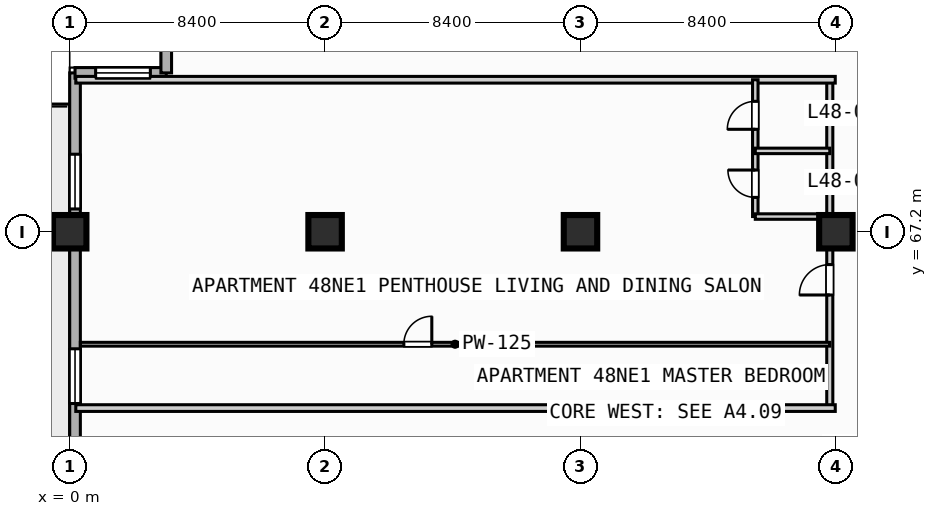
"""IFC4 building model, lengths in metres.
Left out: names, types, materials, properties, quantities, classifications, styles, units other than length and angle.
Written with IfcOpenShell. Run it as: python <this file> out.ifc"""

import sys

from ifc_helpers import new_model, si_unit, direction, frame, frame_2d, origin, origin_2d, place, context, subcontext, project, spatial, rectangle, extrude, element, fill, save


model = new_model("IFC4")
c1 = context("Model", 3, precision=1e-05, world=origin(), true_north=direction((0.0, 1.0)))
c2 = subcontext(c1, "Body", "Model", "MODEL_VIEW")
j1 = project(units=[si_unit("LENGTHUNIT", "METRE"), si_unit("PLANEANGLEUNIT", "RADIAN")], contexts=[c1])
p1 = place(None, origin())
s1 = spatial("IfcSite", under=j1, at=p1, CompositionType="ELEMENT")
p2 = place(p1, origin())
s2 = spatial("IfcBuilding", under=s1, at=p2, CompositionType="ELEMENT")
p3 = place(p2, frame((0.0, 0.0, 197.6)))
s3 = spatial("IfcBuildingStorey", under=s2, at=p3, CompositionType="ELEMENT", Elevation=197.6)
for number, where, z_axis, x_axis in (
    (1, (0.0, 67.2, 0.0), (0.0, 0.0, 1.0), (1.0, 0.0, 0.0)),
    (2, (8.4, 67.2, 0.0), (0.0, 0.0, 1.0), (1.0, 0.0, 0.0)),
    (3, (16.8, 67.2, 0.0), (0.0, 0.0, 1.0), (1.0, 0.0, 0.0)),
    (4, (25.2, 67.2, 0.0), (0.0, 0.0, 1.0), (1.0, 0.0, 0.0)),
):
    element("IfcColumn", number, at=place(p3, frame(where, z_axis=z_axis, x_axis=x_axis)), inside=s3, PredefinedType="COLUMN", context=c2, shape_type="SweptSolid", body=[
        extrude(rectangle(XDim=1.1, YDim=1.1, at=origin_2d()), origin(), (0.0, 0.0, 1.0), 3.7),
    ])
p4 = place(p3, frame((0.175, 3.175, 0.0), z_axis=(0.0, 0.0, 1.0), x_axis=(0.0, 1.0, 0.0)))
e5 = element("IfcWall", 5, at=p4, inside=s3, PredefinedType="STANDARD", context=c2, shape_type="SweptSolid", body=[
    extrude(rectangle(XDim=69.25, YDim=0.35, at=frame_2d((34.625, 0.0))), origin(), (0.0, 0.0, 1.0), 3.47),
])
p5 = place(p4, frame((42.325, 0.0, 0.0)))
e6 = element("IfcOpeningElement", 6, at=p5, cuts=e5, PredefinedType="OPENING", context=c2, shape_type="SweptSolid", body=[
    extrude(rectangle(XDim=1.4, YDim=2.2, at=frame_2d((0.7, 1.1))), frame((0.0, 0.185, 0.0), z_axis=(0.0, -1.0, 0.0), x_axis=(1.0, 0.0, 0.0)), (0.0, 0.0, 1.0), 0.37),
])
p6 = place(p4, frame((25.025, 0.0, 0.85)))
e7 = element("IfcOpeningElement", 7, at=p6, cuts=e5, PredefinedType="OPENING", context=c2, shape_type="SweptSolid", body=[
    extrude(rectangle(XDim=2.4, YDim=1.95, at=frame_2d((1.2, 0.975))), frame((0.0, 0.185, 0.0), z_axis=(0.0, -1.0, 0.0), x_axis=(1.0, 0.0, 0.0)), (0.0, 0.0, 1.0), 0.37),
])
p7 = place(p4, frame((33.725, 0.0, 0.85)))
e8 = element("IfcOpeningElement", 8, at=p7, cuts=e5, PredefinedType="OPENING", context=c2, shape_type="SweptSolid", body=[
    extrude(rectangle(XDim=1.8, YDim=1.8, at=frame_2d((0.9, 0.9))), frame((0.0, 0.185, 0.0), z_axis=(0.0, -1.0, 0.0), x_axis=(1.0, 0.0, 0.0)), (0.0, 0.0, 1.0), 0.37),
])
p8 = place(p4, frame((58.375, 0.0, 0.85)))
e9 = element("IfcOpeningElement", 9, at=p8, cuts=e5, PredefinedType="OPENING", context=c2, shape_type="SweptSolid", body=[
    extrude(rectangle(XDim=1.8, YDim=1.8, at=frame_2d((0.9, 0.9))), frame((0.0, 0.185, 0.0), z_axis=(0.0, -1.0, 0.0), x_axis=(1.0, 0.0, 0.0)), (0.0, 0.0, 1.0), 0.37),
])
p9 = place(p4, frame((64.775, 0.0, 0.85)))
e10 = element("IfcOpeningElement", 10, at=p9, cuts=e5, PredefinedType="OPENING", context=c2, shape_type="SweptSolid", body=[
    extrude(rectangle(XDim=1.8, YDim=1.8, at=frame_2d((0.9, 0.9))), frame((0.0, 0.185, 0.0), z_axis=(0.0, -1.0, 0.0), x_axis=(1.0, 0.0, 0.0)), (0.0, 0.0, 1.0), 0.37),
])
p10 = place(p3, frame((0.175, 72.425, 0.0), z_axis=(0.0, 0.0, 1.0), x_axis=(1.0, 0.0, 0.0)))
e11 = element("IfcWall", 11, at=p10, inside=s3, PredefinedType="STANDARD", context=c2, shape_type="SweptSolid", body=[
    extrude(rectangle(XDim=3.0, YDim=0.35, at=frame_2d((1.5, 0.0))), origin(), (0.0, 0.0, 1.0), 3.47),
])
p11 = place(p10, frame((0.677, 0.0, 0.85)))
e12 = element("IfcOpeningElement", 12, at=p11, cuts=e11, PredefinedType="OPENING", context=c2, shape_type="SweptSolid", body=[
    extrude(rectangle(XDim=1.8, YDim=1.8, at=frame_2d((0.9, 0.9))), frame((0.0, 0.185, 0.0), z_axis=(0.0, -1.0, 0.0), x_axis=(1.0, 0.0, 0.0)), (0.0, 0.0, 1.0), 0.37),
])
p12 = place(p3, frame((3.175, 72.425, 0.0), z_axis=(0.0, 0.0, 1.0), x_axis=(0.0, 1.0, 0.0)))
e13 = element("IfcWall", 13, at=p12, inside=s3, PredefinedType="STANDARD", context=c2, shape_type="SweptSolid", body=[
    extrude(rectangle(XDim=3.0, YDim=0.35, at=frame_2d((1.5, 0.0))), origin(), (0.0, 0.0, 1.0), 3.47),
])
p13 = place(p3, frame((25.0, 61.4, 0.0), z_axis=(0.0, 0.0, 1.0), x_axis=(0.0, 1.0, 0.0)))
e14 = element("IfcWall", 14, at=p13, inside=s3, PredefinedType="PARTITIONING", context=c2, shape_type="SweptSolid", body=[
    extrude(rectangle(XDim=10.8, YDim=0.2, at=frame_2d((5.4, 0.0))), origin(), (0.0, 0.0, 1.0), 2.82),
])
p14 = place(p13, frame((3.72, 0.0, 0.0)))
e15 = element("IfcOpeningElement", 15, at=p14, cuts=e14, PredefinedType="OPENING", context=c2, shape_type="SweptSolid", body=[
    extrude(rectangle(XDim=1.0, YDim=2.15, at=frame_2d((0.5, 1.075))), frame((0.0, 0.11, 0.0), z_axis=(0.0, -1.0, 0.0), x_axis=(1.0, 0.0, 0.0)), (0.0, 0.0, 1.0), 0.22),
])
for number, where, z_axis, x_axis in (
    (16, (0.2, 61.4, 0.0), (0.0, 0.0, 1.0), (1.0, 0.0, 0.0)),
    (17, (0.2, 72.2, 0.0), (0.0, 0.0, 1.0), (1.0, 0.0, 0.0)),
):
    element("IfcWall", number, at=place(p3, frame(where, z_axis=z_axis, x_axis=x_axis)), inside=s3, PredefinedType="PARTITIONING", context=c2, shape_type="SweptSolid", body=[
        extrude(rectangle(XDim=24.98, YDim=0.22, at=frame_2d((12.49, 0.0))), origin(), (0.0, 0.0, 1.0), 3.47),
    ])
p15 = place(p3, frame((22.55, 67.7, 0.0), z_axis=(0.0, 0.0, 1.0), x_axis=(0.0, 1.0, 0.0)))
e18 = element("IfcWall", 18, at=p15, inside=s3, PredefinedType="PLUMBINGWALL", context=c2, shape_type="SweptSolid", body=[
    extrude(rectangle(XDim=4.5, YDim=0.18, at=frame_2d((2.25, 0.0))), origin(), (0.0, 0.0, 1.0), 3.47),
])
p16 = place(p15, frame((0.63, 0.0, 0.0)))
e19 = element("IfcOpeningElement", 19, at=p16, cuts=e18, PredefinedType="OPENING", context=c2, shape_type="SweptSolid", body=[
    extrude(rectangle(XDim=0.9, YDim=2.1, at=frame_2d((0.45, 1.05))), frame((0.0, 0.1, 0.0), z_axis=(0.0, -1.0, 0.0), x_axis=(1.0, 0.0, 0.0)), (0.0, 0.0, 1.0), 0.2),
])
p17 = place(p15, frame((2.87, 0.0, 0.0)))
e20 = element("IfcOpeningElement", 20, at=p17, cuts=e18, PredefinedType="OPENING", context=c2, shape_type="SweptSolid", body=[
    extrude(rectangle(XDim=0.92, YDim=2.1, at=frame_2d((0.46, 1.05))), frame((0.0, 0.1, 0.0), z_axis=(0.0, -1.0, 0.0), x_axis=(1.0, 0.0, 0.0)), (0.0, 0.0, 1.0), 0.2),
])
for number, where, z_axis, x_axis in (
    (21, (22.55, 67.7, 0.0), (0.0, 0.0, 1.0), (1.0, 0.0, 0.0)),
    (22, (22.55, 69.86, 0.0), (0.0, 0.0, 1.0), (1.0, 0.0, 0.0)),
):
    element("IfcWall", number, at=place(p3, frame(where, z_axis=z_axis, x_axis=x_axis)), inside=s3, PredefinedType="PLUMBINGWALL", context=c2, shape_type="SweptSolid", body=[
        extrude(rectangle(XDim=2.45, YDim=0.18, at=frame_2d((1.225, 0.0))), origin(), (0.0, 0.0, 1.0), 3.47),
    ])
p18 = place(p3, frame((0.35, 63.5, 0.0), z_axis=(0.0, 0.0, 1.0), x_axis=(1.0, 0.0, 0.0)))
e23 = element("IfcWall", 23, at=p18, inside=s3, PredefinedType="PARTITIONING", context=c2, shape_type="SweptSolid", body=[
    extrude(rectangle(XDim=24.65, YDim=0.125, at=frame_2d((12.325, 0.0))), origin(), (0.0, 0.0, 1.0), 3.47),
])
p19 = place(p18, frame((10.64, 0.0, 0.0)))
e24 = element("IfcOpeningElement", 24, at=p19, cuts=e23, PredefinedType="OPENING", context=c2, shape_type="SweptSolid", body=[
    extrude(rectangle(XDim=0.92, YDim=2.1, at=frame_2d((0.46, 1.05))), frame((0.0, 0.073, 0.0), z_axis=(0.0, -1.0, 0.0), x_axis=(1.0, 0.0, 0.0)), (0.0, 0.0, 1.0), 0.145),
])
p20 = place(p8, origin())
e25 = element("IfcWindow", 25, at=p20, inside=s3, PartitioningType="SINGLE_PANEL", PredefinedType="WINDOW", context=c2, shape_type="SweptSolid", body=[
    extrude(rectangle(XDim=1.8, YDim=1.8, at=frame_2d((0.9, 0.9))), frame((0.0, 0.03, 0.0), z_axis=(0.0, -1.0, 0.0), x_axis=(1.0, 0.0, 0.0)), (0.0, 0.0, 1.0), 0.06),
])
fill(e9, e25)
p21 = place(p9, origin())
e26 = element("IfcWindow", 26, at=p21, inside=s3, PartitioningType="SINGLE_PANEL", PredefinedType="WINDOW", context=c2, shape_type="SweptSolid", body=[
    extrude(rectangle(XDim=1.8, YDim=1.8, at=frame_2d((0.9, 0.9))), frame((0.0, 0.03, 0.0), z_axis=(0.0, -1.0, 0.0), x_axis=(1.0, 0.0, 0.0)), (0.0, 0.0, 1.0), 0.06),
])
fill(e10, e26)
p22 = place(p11, origin())
e27 = element("IfcWindow", 27, at=p22, inside=s3, PartitioningType="SINGLE_PANEL", PredefinedType="WINDOW", context=c2, shape_type="SweptSolid", body=[
    extrude(rectangle(XDim=1.8, YDim=1.8, at=frame_2d((0.9, 0.9))), frame((0.0, 0.03, 0.0), z_axis=(0.0, -1.0, 0.0), x_axis=(1.0, 0.0, 0.0)), (0.0, 0.0, 1.0), 0.06),
])
fill(e12, e27)
p23 = place(p14, origin())
e28 = element("IfcDoor", 28, at=p23, inside=s3, OperationType="SINGLE_SWING_LEFT", PredefinedType="DOOR", context=c2, shape_type="SweptSolid", body=[
    extrude(rectangle(XDim=1.0, YDim=2.15, at=frame_2d((0.5, 1.075))), frame((0.0, 0.025, 0.0), z_axis=(0.0, -1.0, 0.0), x_axis=(1.0, 0.0, 0.0)), (0.0, 0.0, 1.0), 0.05),
])
fill(e15, e28)
p24 = place(p16, origin())
e29 = element("IfcDoor", 29, at=p24, inside=s3, OperationType="SINGLE_SWING_RIGHT", PredefinedType="DOOR", context=c2, shape_type="SweptSolid", body=[
    extrude(rectangle(XDim=0.9, YDim=2.1, at=frame_2d((0.45, 1.05))), frame((0.0, 0.025, 0.0), z_axis=(0.0, -1.0, 0.0), x_axis=(1.0, 0.0, 0.0)), (0.0, 0.0, 1.0), 0.05),
])
fill(e19, e29)
p25 = place(p17, origin())
e30 = element("IfcDoor", 30, at=p25, inside=s3, OperationType="SINGLE_SWING_LEFT", PredefinedType="DOOR", context=c2, shape_type="SweptSolid", body=[
    extrude(rectangle(XDim=0.92, YDim=2.1, at=frame_2d((0.46, 1.05))), frame((0.0, 0.025, 0.0), z_axis=(0.0, -1.0, 0.0), x_axis=(1.0, 0.0, 0.0)), (0.0, 0.0, 1.0), 0.05),
])
fill(e20, e30)
p26 = place(p19, origin())
e31 = element("IfcDoor", 31, at=p26, inside=s3, OperationType="SINGLE_SWING_RIGHT", PredefinedType="DOOR", context=c2, shape_type="SweptSolid", body=[
    extrude(rectangle(XDim=0.92, YDim=2.1, at=frame_2d((0.46, 1.05))), frame((0.0, 0.025, 0.0), z_axis=(0.0, -1.0, 0.0), x_axis=(1.0, 0.0, 0.0)), (0.0, 0.0, 1.0), 0.05),
])
fill(e24, e31)
save(model, sys.argv[1])
